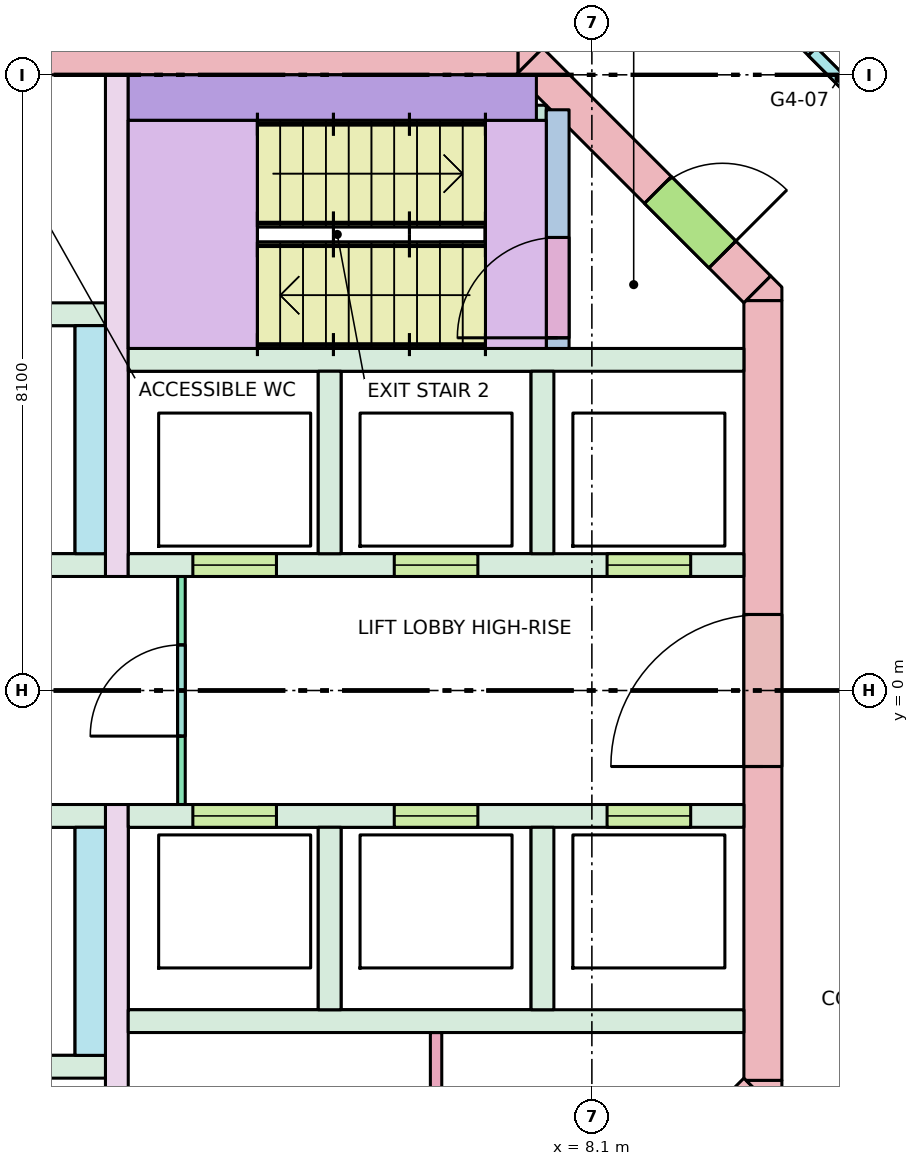
"""IFC4 building model, lengths in metres.
Left out: names, types, materials, properties, quantities, classifications, styles, units other than length and angle.
Written with IfcOpenShell. Run it as: python <this file> out.ifc"""

import sys

from ifc_helpers import new_model, si_unit, direction, frame, frame_2d, origin, place, context, subcontext, project, spatial, polyline, rectangle, outline, extrude, element, fill, save


model = new_model("IFC4")
c1 = context("Model", 3, precision=1e-05, world=origin(), true_north=direction((0.0, 1.0)))
c2 = subcontext(c1, "Body", "Model", "MODEL_VIEW")
j1 = project(units=[si_unit("LENGTHUNIT", "METRE"), si_unit("PLANEANGLEUNIT", "RADIAN")], contexts=[c1])
p1 = place(None, origin())
s1 = spatial("IfcSite", under=j1, at=p1, CompositionType="ELEMENT")
p2 = place(p1, origin())
s2 = spatial("IfcBuilding", under=s1, at=p2, CompositionType="ELEMENT")
p3 = place(p2, frame((0.0, 0.0, 276.0)))
s3 = spatial("IfcBuildingStorey", under=s2, at=p3, CompositionType="ELEMENT", Elevation=276.0)
p4 = place(p3, frame((-7.13, 8.35, -0.28), z_axis=(0.0, 0.0, 1.0), x_axis=(1.0, 0.0, 0.0)))
e1 = element("IfcWall", 1, at=p4, inside=s3, PredefinedType="SHEAR", context=c2, shape_type="SweptSolid", body=[
    extrude(rectangle(XDim=14.26, YDim=0.5, at=frame_2d((7.13, 0.0))), origin(), (0.0, 0.0, 1.0), 7.4),
])
p5 = place(p4, frame((5.48, 0.0, 0.28)))
e2 = element("IfcOpeningElement", 2, at=p5, cuts=e1, PredefinedType="OPENING", context=c2, shape_type="SweptSolid", body=[
    extrude(rectangle(XDim=0.7, YDim=2.1, at=frame_2d((0.35, 1.05))), frame((0.0, 0.26, 0.0), z_axis=(0.0, -1.0, 0.0), x_axis=(1.0, 0.0, 0.0)), (0.0, 0.0, 1.0), 0.52),
])
p6 = place(p4, frame((7.155, 0.0, 0.28)))
e3 = element("IfcOpeningElement", 3, at=p6, cuts=e1, PredefinedType="OPENING", context=c2, shape_type="SweptSolid", body=[
    extrude(rectangle(XDim=0.9, YDim=2.1, at=frame_2d((0.45, 1.05))), frame((0.0, 0.26, 0.0), z_axis=(0.0, -1.0, 0.0), x_axis=(1.0, 0.0, 0.0)), (0.0, 0.0, 1.0), 0.52),
])
p7 = place(p3, frame((10.35, -5.13, -0.28), z_axis=(0.0, 0.0, 1.0), x_axis=(0.0, 1.0, 0.0)))
e4 = element("IfcWall", 4, at=p7, inside=s3, PredefinedType="SHEAR", context=c2, shape_type="SweptSolid", body=[
    extrude(rectangle(XDim=10.26, YDim=0.5, at=frame_2d((5.13, 0.0))), origin(), (0.0, 0.0, 1.0), 7.4),
])
p8 = place(p7, frame((4.13, 0.0, 0.28)))
e5 = element("IfcOpeningElement", 5, at=p8, cuts=e4, PredefinedType="OPENING", context=c2, shape_type="SweptSolid", body=[
    extrude(rectangle(XDim=2.0, YDim=2.1, at=frame_2d((1.0, 1.05))), frame((0.0, 0.26, 0.0), z_axis=(0.0, -1.0, 0.0), x_axis=(1.0, 0.0, 0.0)), (0.0, 0.0, 1.0), 0.52),
])
p9 = place(p3, frame((7.277, 8.277, -0.28), z_axis=(0.0, 0.0, 1.0), x_axis=(0.707106781187, -0.707106781187, 0.0)))
e6 = element("IfcWall", 6, at=p9, inside=s3, PredefinedType="SHEAR", context=c2, shape_type="SweptSolid", body=[
    extrude(rectangle(XDim=4.243, YDim=0.5, at=frame_2d((2.121, 0.0))), origin(), (0.0, 0.0, 1.0), 7.4),
])
p10 = place(p9, frame((2.393, 0.0, 0.28)))
e7 = element("IfcOpeningElement", 7, at=p10, cuts=e6, PredefinedType="OPENING", context=c2, shape_type="SweptSolid", body=[
    extrude(rectangle(XDim=1.2, YDim=2.1, at=frame_2d((0.6, 1.05))), frame((0.0, 0.26, 0.0), z_axis=(0.0, -1.0, 0.0), x_axis=(1.0, 0.0, 0.0)), (0.0, 0.0, 1.0), 0.52),
])
p11 = place(p3, frame((10.277, -5.277, -0.28), z_axis=(0.0, 0.0, 1.0), x_axis=(-0.707106781187, -0.707106781187, 0.0)))
e8 = element("IfcWall", 8, at=p11, inside=s3, PredefinedType="SHEAR", context=c2, shape_type="SweptSolid", body=[
    extrude(rectangle(XDim=4.243, YDim=0.5, at=frame_2d((2.121, 0.0))), origin(), (0.0, 0.0, 1.0), 7.4),
])
p12 = place(p11, frame((0.52, 0.0, 0.28)))
e9 = element("IfcOpeningElement", 9, at=p12, cuts=e8, PredefinedType="OPENING", context=c2, shape_type="SweptSolid", body=[
    extrude(rectangle(XDim=0.9, YDim=2.1, at=frame_2d((0.45, 1.05))), frame((0.0, 0.26, 0.0), z_axis=(0.0, -1.0, 0.0), x_axis=(1.0, 0.0, 0.0)), (0.0, 0.0, 1.0), 0.52),
])
p13 = place(p3, frame((0.0, 0.0, -0.28)))
e10 = element("IfcWall", 10, at=p13, inside=s3, PredefinedType="SHEAR", context=c2, shape_type="SweptSolid", body=[
    extrude(outline(polyline([(10.6, -5.307), (10.454, -5.454), (10.13, -5.13), (10.6, -5.13), (10.6, -5.307)])), origin(), (0.0, 0.0, 1.0), 7.4),
])
p14 = place(p3, frame((0.0, 0.0, -0.28)))
e11 = element("IfcWall", 11, at=p14, inside=s3, PredefinedType="SHEAR", context=c2, shape_type="SweptSolid", body=[
    extrude(outline(polyline([(10.6, 5.307), (10.6, 5.13), (10.13, 5.13), (10.454, 5.454), (10.6, 5.307)])), origin(), (0.0, 0.0, 1.0), 7.4),
])
p15 = place(p3, frame((0.0, 0.0, -0.28)))
e12 = element("IfcWall", 12, at=p15, inside=s3, PredefinedType="SHEAR", context=c2, shape_type="SweptSolid", body=[
    extrude(outline(polyline([(7.307, 8.6), (7.454, 8.454), (7.13, 8.13), (7.13, 8.6), (7.307, 8.6)])), origin(), (0.0, 0.0, 1.0), 7.4),
])
for number, where, z_axis, x_axis in (
    (13, (2.0, 4.35, 0.0), (0.0, 0.0, 1.0), (1.0, 0.0, 0.0)),
    (14, (2.0, -4.35, 0.0), (0.0, 0.0, 1.0), (1.0, 0.0, 0.0)),
):
    element("IfcWall", number, at=place(p3, frame(where, z_axis=z_axis, x_axis=x_axis)), inside=s3, PredefinedType="SOLIDWALL", context=c2, shape_type="SweptSolid", body=[
        extrude(rectangle(XDim=8.1, YDim=0.3, at=frame_2d((4.05, 0.0))), origin(), (0.0, 0.0, 1.0), 7.12),
    ])
p16 = place(p3, frame((2.0, 1.65, 0.0), z_axis=(0.0, 0.0, 1.0), x_axis=(1.0, 0.0, 0.0)))
e15 = element("IfcWall", 15, at=p16, inside=s3, PredefinedType="SOLIDWALL", context=c2, shape_type="SweptSolid", body=[
    extrude(rectangle(XDim=8.1, YDim=0.3, at=frame_2d((4.05, 0.0))), origin(), (0.0, 0.0, 1.0), 7.12),
])
p17 = place(p16, frame((0.85, 0.0, 0.0)))
e16 = element("IfcOpeningElement", 16, at=p17, cuts=e15, PredefinedType="OPENING", context=c2, shape_type="SweptSolid", body=[
    extrude(rectangle(XDim=1.1, YDim=2.1, at=frame_2d((0.55, 1.05))), frame((0.0, 0.16, 0.0), z_axis=(0.0, -1.0, 0.0), x_axis=(1.0, 0.0, 0.0)), (0.0, 0.0, 1.0), 0.32),
])
p18 = place(p16, frame((3.5, 0.0, 0.0)))
e17 = element("IfcOpeningElement", 17, at=p18, cuts=e15, PredefinedType="OPENING", context=c2, shape_type="SweptSolid", body=[
    extrude(rectangle(XDim=1.1, YDim=2.1, at=frame_2d((0.55, 1.05))), frame((0.0, 0.16, 0.0), z_axis=(0.0, -1.0, 0.0), x_axis=(1.0, 0.0, 0.0)), (0.0, 0.0, 1.0), 0.32),
])
p19 = place(p16, frame((6.3, 0.0, 0.0)))
e18 = element("IfcOpeningElement", 18, at=p19, cuts=e15, PredefinedType="OPENING", context=c2, shape_type="SweptSolid", body=[
    extrude(rectangle(XDim=1.1, YDim=2.1, at=frame_2d((0.55, 1.05))), frame((0.0, 0.16, 0.0), z_axis=(0.0, -1.0, 0.0), x_axis=(1.0, 0.0, 0.0)), (0.0, 0.0, 1.0), 0.32),
])
p20 = place(p3, frame((2.0, -1.65, 0.0), z_axis=(0.0, 0.0, 1.0), x_axis=(1.0, 0.0, 0.0)))
e19 = element("IfcWall", 19, at=p20, inside=s3, PredefinedType="SOLIDWALL", context=c2, shape_type="SweptSolid", body=[
    extrude(rectangle(XDim=8.1, YDim=0.3, at=frame_2d((4.05, 0.0))), origin(), (0.0, 0.0, 1.0), 7.12),
])
p21 = place(p20, frame((0.85, 0.0, 0.0)))
e20 = element("IfcOpeningElement", 20, at=p21, cuts=e19, PredefinedType="OPENING", context=c2, shape_type="SweptSolid", body=[
    extrude(rectangle(XDim=1.1, YDim=2.1, at=frame_2d((0.55, 1.05))), frame((0.0, 0.16, 0.0), z_axis=(0.0, -1.0, 0.0), x_axis=(1.0, 0.0, 0.0)), (0.0, 0.0, 1.0), 0.32),
])
p22 = place(p20, frame((3.5, 0.0, 0.0)))
e21 = element("IfcOpeningElement", 21, at=p22, cuts=e19, PredefinedType="OPENING", context=c2, shape_type="SweptSolid", body=[
    extrude(rectangle(XDim=1.1, YDim=2.1, at=frame_2d((0.55, 1.05))), frame((0.0, 0.16, 0.0), z_axis=(0.0, -1.0, 0.0), x_axis=(1.0, 0.0, 0.0)), (0.0, 0.0, 1.0), 0.32),
])
p23 = place(p20, frame((6.3, 0.0, 0.0)))
e22 = element("IfcOpeningElement", 22, at=p23, cuts=e19, PredefinedType="OPENING", context=c2, shape_type="SweptSolid", body=[
    extrude(rectangle(XDim=1.1, YDim=2.1, at=frame_2d((0.55, 1.05))), frame((0.0, 0.16, 0.0), z_axis=(0.0, -1.0, 0.0), x_axis=(1.0, 0.0, 0.0)), (0.0, 0.0, 1.0), 0.32),
])
for number, where, z_axis, x_axis in (
    (23, (4.65, 1.8, 0.0), (0.0, 0.0, 1.0), (0.0, 1.0, 0.0)),
    (24, (4.65, -4.2, 0.0), (0.0, 0.0, 1.0), (0.0, 1.0, 0.0)),
    (25, (7.45, 1.8, 0.0), (0.0, 0.0, 1.0), (0.0, 1.0, 0.0)),
    (26, (7.45, -4.2, 0.0), (0.0, 0.0, 1.0), (0.0, 1.0, 0.0)),
):
    element("IfcWall", number, at=place(p3, frame(where, z_axis=z_axis, x_axis=x_axis)), inside=s3, PredefinedType="SOLIDWALL", context=c2, shape_type="SweptSolid", body=[
        extrude(rectangle(XDim=2.4, YDim=0.3, at=frame_2d((1.2, 0.0))), origin(), (0.0, 0.0, 1.0), 7.12),
    ])
for number, where, z_axis, x_axis in (
    (27, (1.85, 1.5, 0.0), (0.0, 0.0, 1.0), (0.0, 1.0, 0.0)),
    (28, (1.85, -8.1, 0.0), (0.0, 0.0, 1.0), (0.0, 1.0, 0.0)),
):
    element("IfcWall", number, at=place(p3, frame(where, z_axis=z_axis, x_axis=x_axis)), inside=s3, PredefinedType="SHEAR", context=c2, shape_type="SweptSolid", body=[
        extrude(rectangle(XDim=6.6, YDim=0.3, at=frame_2d((3.3, 0.0))), origin(), (0.0, 0.0, 1.0), 7.12),
    ])
p24 = place(p3, frame((-1.7, 1.65, 0.0), z_axis=(0.0, 0.0, 1.0), x_axis=(1.0, 0.0, 0.0)))
e29 = element("IfcWall", 29, at=p24, inside=s3, PredefinedType="SOLIDWALL", context=c2, shape_type="SweptSolid", body=[
    extrude(rectangle(XDim=3.4, YDim=0.3, at=frame_2d((1.7, 0.0))), origin(), (0.0, 0.0, 1.0), 7.12),
])
p25 = place(p24, frame((1.15, 0.0, 0.0)))
e30 = element("IfcOpeningElement", 30, at=p25, cuts=e29, PredefinedType="OPENING", context=c2, shape_type="SweptSolid", body=[
    extrude(rectangle(XDim=1.1, YDim=2.1, at=frame_2d((0.55, 1.05))), frame((0.0, 0.16, 0.0), z_axis=(0.0, -1.0, 0.0), x_axis=(1.0, 0.0, 0.0)), (0.0, 0.0, 1.0), 0.32),
])
p26 = place(p3, frame((-1.7, -1.65, 0.0), z_axis=(0.0, 0.0, 1.0), x_axis=(1.0, 0.0, 0.0)))
e31 = element("IfcWall", 31, at=p26, inside=s3, PredefinedType="SOLIDWALL", context=c2, shape_type="SweptSolid", body=[
    extrude(rectangle(XDim=3.4, YDim=0.3, at=frame_2d((1.7, 0.0))), origin(), (0.0, 0.0, 1.0), 7.12),
])
p27 = place(p26, frame((1.15, 0.0, 0.0)))
e32 = element("IfcOpeningElement", 32, at=p27, cuts=e31, PredefinedType="OPENING", context=c2, shape_type="SweptSolid", body=[
    extrude(rectangle(XDim=1.1, YDim=2.1, at=frame_2d((0.55, 1.05))), frame((0.0, 0.16, 0.0), z_axis=(0.0, -1.0, 0.0), x_axis=(1.0, 0.0, 0.0)), (0.0, 0.0, 1.0), 0.32),
])
for number, where, z_axis, x_axis in (
    (33, (1.5, 1.8, 0.0), (0.0, 0.0, 1.0), (0.0, 1.0, 0.0)),
    (34, (1.5, -4.8, 0.0), (0.0, 0.0, 1.0), (0.0, 1.0, 0.0)),
):
    element("IfcWall", number, at=place(p3, frame(where, z_axis=z_axis, x_axis=x_axis)), inside=s3, PredefinedType="SOLIDWALL", context=c2, shape_type="SweptSolid", body=[
        extrude(rectangle(XDim=3.0, YDim=0.4, at=frame_2d((1.5, 0.0))), origin(), (0.0, 0.0, 1.0), 7.12),
    ])
for number, where, z_axis, x_axis in (
    (35, (-1.7, 4.95, 0.0), (0.0, 0.0, 1.0), (1.0, 0.0, 0.0)),
    (36, (-1.7, -4.95, 0.0), (0.0, 0.0, 1.0), (1.0, 0.0, 0.0)),
):
    element("IfcWall", number, at=place(p3, frame(where, z_axis=z_axis, x_axis=x_axis)), inside=s3, PredefinedType="SOLIDWALL", context=c2, shape_type="SweptSolid", body=[
        extrude(rectangle(XDim=3.4, YDim=0.3, at=frame_2d((1.7, 0.0))), origin(), (0.0, 0.0, 1.0), 7.12),
    ])
p28 = place(p3, frame((7.65, 4.5, 0.0), z_axis=(0.0, 0.0, 1.0), x_axis=(0.0, 1.0, 0.0)))
e37 = element("IfcWall", 37, at=p28, inside=s3, PredefinedType="SHEAR", context=c2, shape_type="SweptSolid", body=[
    extrude(rectangle(XDim=3.14, YDim=0.3, at=frame_2d((1.57, 0.0))), origin(), (0.0, 0.0, 1.0), 7.12),
])
p29 = place(p28, frame((0.14, 0.0, 0.0)))
e38 = element("IfcOpeningElement", 38, at=p29, cuts=e37, PredefinedType="OPENING", context=c2, shape_type="SweptSolid", body=[
    extrude(rectangle(XDim=1.32, YDim=2.1, at=frame_2d((0.66, 1.05))), frame((0.0, 0.16, 0.0), z_axis=(0.0, -1.0, 0.0), x_axis=(1.0, 0.0, 0.0)), (0.0, 0.0, 1.0), 0.32),
])
p30 = place(p3, frame((2.0, 7.8, 0.0), z_axis=(0.0, 0.0, 1.0), x_axis=(1.0, 0.0, 0.0)))
e39 = element("IfcWall", 39, at=p30, inside=s3, PredefinedType="SHEAR", context=c2, shape_type="SweptSolid", body=[
    extrude(rectangle(XDim=5.37, YDim=0.6, at=frame_2d((2.685, 0.0))), origin(), (0.0, 0.0, 1.0), 7.12),
])
p31 = place(p3, frame((6.9, 7.6, 0.0), z_axis=(0.0, 0.0, 1.0), x_axis=(1.0, 0.0, 0.0)))
e40 = element("IfcWall", 40, at=p31, inside=s3, PredefinedType="SHEAR", context=c2, shape_type="SweptSolid", body=[
    extrude(rectangle(XDim=0.6, YDim=0.2, at=frame_2d((0.3, 0.0))), origin(), (0.0, 0.0, 1.0), 7.12),
])
p32 = place(p3, frame((2.7, -1.5, 0.0), z_axis=(0.0, 0.0, 1.0), x_axis=(0.0, 1.0, 0.0)))
e41 = element("IfcWall", 41, at=p32, inside=s3, PredefinedType="PARTITIONING", context=c2, shape_type="SweptSolid", body=[
    extrude(rectangle(XDim=3.0, YDim=0.1, at=frame_2d((1.5, 0.0))), origin(), (0.0, 0.0, 1.0), 7.12),
])
p33 = place(p32, frame((0.9, 0.0, 0.0)))
e42 = element("IfcOpeningElement", 42, at=p33, cuts=e41, PredefinedType="OPENING", context=c2, shape_type="SweptSolid", body=[
    extrude(rectangle(XDim=1.2, YDim=2.1, at=frame_2d((0.6, 1.05))), frame((0.0, 0.06, 0.0), z_axis=(0.0, -1.0, 0.0), x_axis=(1.0, 0.0, 0.0)), (0.0, 0.0, 1.0), 0.12),
])
p34 = place(p3, frame((6.05, -8.1, 0.0), z_axis=(0.0, 0.0, 1.0), x_axis=(0.0, 1.0, 0.0)))
e43 = element("IfcWall", 43, at=p34, inside=s3, PredefinedType="PARTITIONING", context=c2, shape_type="SweptSolid", body=[
    extrude(rectangle(XDim=3.6, YDim=0.15, at=frame_2d((1.8, 0.0))), origin(), (0.0, 0.0, 1.0), 7.12),
])
p35 = place(p3, frame((8.369, 11.038, 0.0), z_axis=(0.0, 0.0, 1.0), x_axis=(0.707106781187, -0.707106781187, 0.0)))
e44 = element("IfcWall", 44, at=p35, inside=s3, PredefinedType="PARTITIONING", context=c2, shape_type="SweptSolid", body=[
    extrude(rectangle(XDim=6.602, YDim=0.15, at=frame_2d((3.301, 0.0))), origin(), (0.0, 0.0, 1.0), 6.27),
])
p36 = place(p35, frame((3.719, 0.0, 0.0)))
e45 = element("IfcOpeningElement", 45, at=p36, cuts=e44, PredefinedType="OPENING", context=c2, shape_type="SweptSolid", body=[
    extrude(rectangle(XDim=1.0, YDim=2.1, at=frame_2d((0.5, 1.05))), frame((0.0, 0.085, 0.0), z_axis=(0.0, -1.0, 0.0), x_axis=(1.0, 0.0, 0.0)), (0.0, 0.0, 1.0), 0.17),
])
p37 = place(p17, origin())
e46 = element("IfcDoor", 46, at=p37, inside=s3, OperationType="DOUBLE_DOOR_SLIDING", PredefinedType="DOOR", context=c2, shape_type="SweptSolid", body=[
    extrude(rectangle(XDim=1.1, YDim=2.1, at=frame_2d((0.55, 1.05))), frame((0.0, 0.025, 0.0), z_axis=(0.0, -1.0, 0.0), x_axis=(1.0, 0.0, 0.0)), (0.0, 0.0, 1.0), 0.05),
])
fill(e16, e46)
p38 = place(p18, origin())
e47 = element("IfcDoor", 47, at=p38, inside=s3, OperationType="DOUBLE_DOOR_SLIDING", PredefinedType="DOOR", context=c2, shape_type="SweptSolid", body=[
    extrude(rectangle(XDim=1.1, YDim=2.1, at=frame_2d((0.55, 1.05))), frame((0.0, 0.025, 0.0), z_axis=(0.0, -1.0, 0.0), x_axis=(1.0, 0.0, 0.0)), (0.0, 0.0, 1.0), 0.05),
])
fill(e17, e47)
p39 = place(p19, origin())
e48 = element("IfcDoor", 48, at=p39, inside=s3, OperationType="DOUBLE_DOOR_SLIDING", PredefinedType="DOOR", context=c2, shape_type="SweptSolid", body=[
    extrude(rectangle(XDim=1.1, YDim=2.1, at=frame_2d((0.55, 1.05))), frame((0.0, 0.025, 0.0), z_axis=(0.0, -1.0, 0.0), x_axis=(1.0, 0.0, 0.0)), (0.0, 0.0, 1.0), 0.05),
])
fill(e18, e48)
p40 = place(p21, origin())
e49 = element("IfcDoor", 49, at=p40, inside=s3, OperationType="DOUBLE_DOOR_SLIDING", PredefinedType="DOOR", context=c2, shape_type="SweptSolid", body=[
    extrude(rectangle(XDim=1.1, YDim=2.1, at=frame_2d((0.55, 1.05))), frame((0.0, 0.025, 0.0), z_axis=(0.0, -1.0, 0.0), x_axis=(1.0, 0.0, 0.0)), (0.0, 0.0, 1.0), 0.05),
])
fill(e20, e49)
p41 = place(p22, origin())
e50 = element("IfcDoor", 50, at=p41, inside=s3, OperationType="DOUBLE_DOOR_SLIDING", PredefinedType="DOOR", context=c2, shape_type="SweptSolid", body=[
    extrude(rectangle(XDim=1.1, YDim=2.1, at=frame_2d((0.55, 1.05))), frame((0.0, 0.025, 0.0), z_axis=(0.0, -1.0, 0.0), x_axis=(1.0, 0.0, 0.0)), (0.0, 0.0, 1.0), 0.05),
])
fill(e21, e50)
p42 = place(p23, origin())
e51 = element("IfcDoor", 51, at=p42, inside=s3, OperationType="DOUBLE_DOOR_SLIDING", PredefinedType="DOOR", context=c2, shape_type="SweptSolid", body=[
    extrude(rectangle(XDim=1.1, YDim=2.1, at=frame_2d((0.55, 1.05))), frame((0.0, 0.025, 0.0), z_axis=(0.0, -1.0, 0.0), x_axis=(1.0, 0.0, 0.0)), (0.0, 0.0, 1.0), 0.05),
])
fill(e22, e51)
p43 = place(p29, origin())
e52 = element("IfcDoor", 52, at=p43, inside=s3, OperationType="DOUBLE_DOOR_SINGLE_SWING", PredefinedType="DOOR", context=c2, shape_type="SweptSolid", body=[
    extrude(rectangle(XDim=1.32, YDim=2.1, at=frame_2d((0.66, 1.05))), frame((0.0, 0.025, 0.0), z_axis=(0.0, -1.0, 0.0), x_axis=(1.0, 0.0, 0.0)), (0.0, 0.0, 1.0), 0.05),
])
fill(e38, e52)
p44 = place(p10, origin())
e53 = element("IfcDoor", 53, at=p44, inside=s3, OperationType="SINGLE_SWING_RIGHT", PredefinedType="DOOR", context=c2, shape_type="SweptSolid", body=[
    extrude(rectangle(XDim=1.2, YDim=2.1, at=frame_2d((0.6, 1.05))), frame((0.0, 0.025, 0.0), z_axis=(0.0, -1.0, 0.0), x_axis=(1.0, 0.0, 0.0)), (0.0, 0.0, 1.0), 0.05),
])
fill(e7, e53)
p45 = place(p8, origin())
e54 = element("IfcDoor", 54, at=p45, inside=s3, OperationType="DOUBLE_DOOR_SINGLE_SWING", PredefinedType="DOOR", context=c2, shape_type="SweptSolid", body=[
    extrude(rectangle(XDim=2.0, YDim=2.1, at=frame_2d((1.0, 1.05))), frame((0.0, 0.025, 0.0), z_axis=(0.0, -1.0, 0.0), x_axis=(1.0, 0.0, 0.0)), (0.0, 0.0, 1.0), 0.05),
])
fill(e5, e54)
p46 = place(p33, origin())
e55 = element("IfcDoor", 55, at=p46, inside=s3, OperationType="SINGLE_SWING_LEFT", PredefinedType="DOOR", context=c2, shape_type="SweptSolid", body=[
    extrude(rectangle(XDim=1.2, YDim=2.1, at=frame_2d((0.6, 1.05))), frame((0.0, 0.025, 0.0), z_axis=(0.0, -1.0, 0.0), x_axis=(1.0, 0.0, 0.0)), (0.0, 0.0, 1.0), 0.05),
])
fill(e42, e55)
p47 = place(p36, origin())
e56 = element("IfcDoor", 56, at=p47, inside=s3, OperationType="SINGLE_SWING_LEFT", PredefinedType="DOOR", context=c2, shape_type="SweptSolid", body=[
    extrude(rectangle(XDim=1.0, YDim=2.1, at=frame_2d((0.5, 1.05))), frame((0.0, 0.025, 0.0), z_axis=(0.0, -1.0, 0.0), x_axis=(1.0, 0.0, 0.0)), (0.0, 0.0, 1.0), 0.05),
])
fill(e45, e56)
save(model, sys.argv[1])
